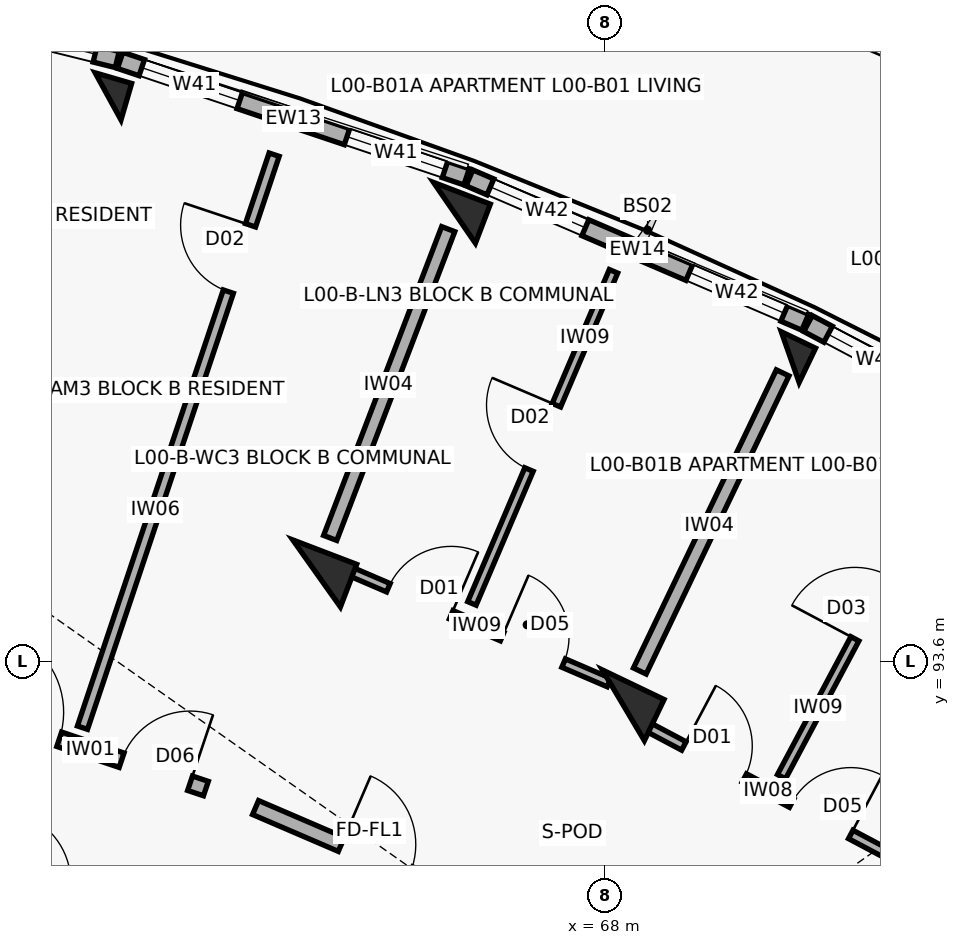
"""IFC4 building model, lengths in metres.
Left out: names, types, materials, properties, quantities, classifications, styles, units other than length and angle.
Written with IfcOpenShell. Run it as: python <this file> out.ifc"""

import sys

from ifc_helpers import new_model, si_unit, direction, frame, frame_2d, origin, origin_2d, place, context, subcontext, project, spatial, rectangle, extrude, element, fill, save


model = new_model("IFC4")
c1 = context("Model", 3, precision=1e-05, world=origin(), true_north=direction((0.0, 1.0)))
c2 = subcontext(c1, "Body", "Model", "MODEL_VIEW")
j1 = project(units=[si_unit("LENGTHUNIT", "METRE"), si_unit("PLANEANGLEUNIT", "RADIAN")], contexts=[c1])
p1 = place(None, origin())
s1 = spatial("IfcSite", under=j1, at=p1, CompositionType="ELEMENT")
p2 = place(p1, origin())
s2 = spatial("IfcBuilding", under=s1, at=p2, CompositionType="ELEMENT")
p3 = place(p2, origin())
s3 = spatial("IfcBuildingStorey", under=s2, at=p3, CompositionType="ELEMENT", Elevation=0.0)
p4 = place(p3, frame((61.467, 101.031, 0.0), z_axis=(0.0, 0.0, 1.0), x_axis=(0.27966144946, 0.96009867914, 0.0)))
e1 = element("IfcColumn", 1, at=p4, inside=s3, PredefinedType="COLUMN", context=c2, shape_type="SweptSolid", body=[
    extrude(rectangle(XDim=0.5, YDim=0.5, at=origin_2d()), origin(), (0.0, 0.0, 1.0), 4.5),
])
p5 = place(p3, frame((64.21, 94.753, 0.0), z_axis=(0.0, 0.0, 1.0), x_axis=(0.357064076459, 0.934079892355, 0.0)))
e2 = element("IfcColumn", 2, at=p5, inside=s3, PredefinedType="COLUMN", context=c2, shape_type="SweptSolid", body=[
    extrude(rectangle(XDim=0.6, YDim=0.9, at=origin_2d()), origin(), (0.0, 0.0, 1.0), 4.5),
])
p6 = place(p3, frame((66.024, 99.499, 0.0), z_axis=(0.0, 0.0, 1.0), x_axis=(0.357064076459, 0.934079892355, 0.0)))
e3 = element("IfcColumn", 3, at=p6, inside=s3, PredefinedType="COLUMN", context=c2, shape_type="SweptSolid", body=[
    extrude(rectangle(XDim=0.55, YDim=0.8, at=origin_2d()), origin(), (0.0, 0.0, 1.0), 4.5),
])
p7 = place(p3, frame((68.246, 93.019, 0.0), z_axis=(0.0, 0.0, 1.0), x_axis=(0.432085748802, 0.901832526405, 0.0)))
e4 = element("IfcColumn", 4, at=p7, inside=s3, PredefinedType="COLUMN", context=c2, shape_type="SweptSolid", body=[
    extrude(rectangle(XDim=0.6, YDim=0.9, at=origin_2d()), origin(), (0.0, 0.0, 1.0), 4.5),
])
p8 = place(p3, frame((70.441, 97.6, 0.0), z_axis=(0.0, 0.0, 1.0), x_axis=(0.432085748802, 0.901832526405, 0.0)))
e5 = element("IfcColumn", 5, at=p8, inside=s3, PredefinedType="COLUMN", context=c2, shape_type="SweptSolid", body=[
    extrude(rectangle(XDim=0.5, YDim=0.5, at=origin_2d()), origin(), (0.0, 0.0, 1.0), 4.5),
])
p9 = place(p3, frame((72.127, 90.96, 0.0), z_axis=(0.0, 0.0, 1.0), x_axis=(0.504226211181, 0.863571611366, 0.0)))
e6 = element("IfcColumn", 6, at=p9, inside=s3, PredefinedType="COLUMN", context=c2, shape_type="SweptSolid", body=[
    extrude(rectangle(XDim=0.6, YDim=0.9, at=origin_2d()), origin(), (0.0, 0.0, 1.0), 4.5),
])
p10 = place(p3, frame((56.919, 102.671, 0.0), z_axis=(0.0, 0.0, 1.0), x_axis=(0.970716115822, -0.240229520426, 0.0)))
e7 = element("IfcWall", 7, at=p10, inside=s3, PredefinedType="SOLIDWALL", context=c2, shape_type="SweptSolid", body=[
    extrude(rectangle(XDim=4.809, YDim=0.218, at=frame_2d((2.405, 0.0))), origin(), (0.0, 0.0, 1.0), 3.45),
])
p11 = place(p10, frame((0.3, 0.0, 0.3)))
e8 = element("IfcOpeningElement", 8, at=p11, cuts=e7, PredefinedType="OPENING", context=c2, shape_type="SweptSolid", body=[
    extrude(rectangle(XDim=1.26, YDim=1.56, at=frame_2d((0.63, 0.78))), frame((0.0, 0.119, 0.0), z_axis=(0.0, -1.0, 0.0), x_axis=(1.0, 0.0, 0.0)), (0.0, 0.0, 1.0), 0.238),
])
p12 = place(p10, frame((3.249, 0.0, 0.3)))
e9 = element("IfcOpeningElement", 9, at=p12, cuts=e7, PredefinedType="OPENING", context=c2, shape_type="SweptSolid", body=[
    extrude(rectangle(XDim=1.26, YDim=1.56, at=frame_2d((0.63, 0.78))), frame((0.0, 0.119, 0.0), z_axis=(0.0, -1.0, 0.0), x_axis=(1.0, 0.0, 0.0)), (0.0, 0.0, 1.0), 0.238),
])
p13 = place(p3, frame((61.625, 101.504, 0.0), z_axis=(0.0, 0.0, 1.0), x_axis=(0.947867898788, -0.318663531717, 0.0)))
e10 = element("IfcWall", 10, at=p13, inside=s3, PredefinedType="SOLIDWALL", context=c2, shape_type="SweptSolid", body=[
    extrude(rectangle(XDim=4.809, YDim=0.224, at=frame_2d((2.405, 0.0))), origin(), (0.0, 0.0, 1.0), 3.45),
])
p14 = place(p13, frame((0.3, 0.0, 0.3)))
e11 = element("IfcOpeningElement", 11, at=p14, cuts=e10, PredefinedType="OPENING", context=c2, shape_type="SweptSolid", body=[
    extrude(rectangle(XDim=1.36, YDim=1.16, at=frame_2d((0.68, 0.58))), frame((0.0, 0.122, 0.0), z_axis=(0.0, -1.0, 0.0), x_axis=(1.0, 0.0, 0.0)), (0.0, 0.0, 1.0), 0.244),
])
p15 = place(p13, frame((3.149, 0.0, 0.3)))
e12 = element("IfcOpeningElement", 12, at=p15, cuts=e10, PredefinedType="OPENING", context=c2, shape_type="SweptSolid", body=[
    extrude(rectangle(XDim=1.36, YDim=1.16, at=frame_2d((0.68, 0.58))), frame((0.0, 0.122, 0.0), z_axis=(0.0, -1.0, 0.0), x_axis=(1.0, 0.0, 0.0)), (0.0, 0.0, 1.0), 0.244),
])
p16 = place(p3, frame((66.221, 99.958, 0.0), z_axis=(0.0, 0.0, 1.0), x_axis=(0.918711189033, -0.394930058548, 0.0)))
e13 = element("IfcWall", 13, at=p16, inside=s3, PredefinedType="SOLIDWALL", context=c2, shape_type="SweptSolid", body=[
    extrude(rectangle(XDim=4.809, YDim=0.228, at=frame_2d((2.404, 0.0))), origin(), (0.0, 0.0, 1.0), 3.45),
])
p17 = place(p16, frame((0.3, 0.0, 0.3)))
e14 = element("IfcOpeningElement", 14, at=p17, cuts=e13, PredefinedType="OPENING", context=c2, shape_type="SweptSolid", body=[
    extrude(rectangle(XDim=1.36, YDim=1.28, at=frame_2d((0.68, 0.64))), frame((0.0, 0.124, 0.0), z_axis=(0.0, -1.0, 0.0), x_axis=(1.0, 0.0, 0.0)), (0.0, 0.0, 1.0), 0.248),
])
p18 = place(p16, frame((3.149, 0.0, 0.3)))
e15 = element("IfcOpeningElement", 15, at=p18, cuts=e13, PredefinedType="OPENING", context=c2, shape_type="SweptSolid", body=[
    extrude(rectangle(XDim=1.36, YDim=1.28, at=frame_2d((0.68, 0.64))), frame((0.0, 0.124, 0.0), z_axis=(0.0, -1.0, 0.0), x_axis=(1.0, 0.0, 0.0)), (0.0, 0.0, 1.0), 0.248),
])
p19 = place(p3, frame((70.675, 98.042, 0.0), z_axis=(0.0, 0.0, 1.0), x_axis=(0.883448093208, -0.468529045639, 0.0)))
e16 = element("IfcWall", 16, at=p19, inside=s3, PredefinedType="SOLIDWALL", context=c2, shape_type="SweptSolid", body=[
    extrude(rectangle(XDim=4.809, YDim=0.238, at=frame_2d((2.405, 0.0))), origin(), (0.0, 0.0, 1.0), 3.45),
])
p20 = place(p19, frame((0.3, 0.0, 0.3)))
e17 = element("IfcOpeningElement", 17, at=p20, cuts=e16, PredefinedType="OPENING", context=c2, shape_type="SweptSolid", body=[
    extrude(rectangle(XDim=1.36, YDim=1.42, at=frame_2d((0.68, 0.71))), frame((0.0, 0.129, 0.0), z_axis=(0.0, -1.0, 0.0), x_axis=(1.0, 0.0, 0.0)), (0.0, 0.0, 1.0), 0.258),
])
p21 = place(p19, frame((3.149, 0.0, 0.3)))
e18 = element("IfcOpeningElement", 18, at=p21, cuts=e16, PredefinedType="OPENING", context=c2, shape_type="SweptSolid", body=[
    extrude(rectangle(XDim=1.36, YDim=1.42, at=frame_2d((0.68, 0.71))), frame((0.0, 0.129, 0.0), z_axis=(0.0, -1.0, 0.0), x_axis=(1.0, 0.0, 0.0)), (0.0, 0.0, 1.0), 0.258),
])
p22 = place(p3, frame((59.497, 93.018, 0.0), z_axis=(0.0, 0.0, 1.0), x_axis=(0.947863007629, -0.318678080151, 0.0)))
e19 = element("IfcWall", 19, at=p22, inside=s3, PredefinedType="SOLIDWALL", context=c2, shape_type="SweptSolid", body=[
    extrude(rectangle(XDim=3.436, YDim=0.2, at=frame_2d((1.718, 0.0))), origin(), (0.0, 0.0, 1.0), 3.34),
])
p23 = place(p22, frame((0.28, 0.0, 0.0)))
e20 = element("IfcOpeningElement", 20, at=p23, cuts=e19, PredefinedType="OPENING", context=c2, shape_type="SweptSolid", body=[
    extrude(rectangle(XDim=1.12, YDim=2.15, at=frame_2d((0.56, 1.075))), frame((0.0, 0.11, 0.0), z_axis=(0.0, -1.0, 0.0), x_axis=(1.0, 0.0, 0.0)), (0.0, 0.0, 1.0), 0.22),
])
p24 = place(p22, frame((2.266, 0.0, 0.0)))
e21 = element("IfcOpeningElement", 21, at=p24, cuts=e19, PredefinedType="OPENING", context=c2, shape_type="SweptSolid", body=[
    extrude(rectangle(XDim=0.95, YDim=2.1, at=frame_2d((0.475, 1.05))), frame((0.0, 0.11, 0.0), z_axis=(0.0, -1.0, 0.0), x_axis=(1.0, 0.0, 0.0)), (0.0, 0.0, 1.0), 0.22),
])
p25 = place(p3, frame((58.923, 91.049, 0.0), z_axis=(0.0, 0.0, 1.0), x_axis=(0.94787351033, -0.318646839643, 0.0)))
e22 = element("IfcWall", 22, at=p25, inside=s3, PredefinedType="SOLIDWALL", context=c2, shape_type="SweptSolid", body=[
    extrude(rectangle(XDim=3.269, YDim=0.19, at=frame_2d((1.634, 0.0))), origin(), (0.0, 0.0, 1.0), 3.34),
])
p26 = place(p25, frame((1.154, 0.0, 0.0)))
e23 = element("IfcOpeningElement", 23, at=p26, cuts=e22, PredefinedType="OPENING", context=c2, shape_type="SweptSolid", body=[
    extrude(rectangle(XDim=0.96, YDim=2.1, at=frame_2d((0.48, 1.05))), frame((0.0, 0.105, 0.0), z_axis=(0.0, -1.0, 0.0), x_axis=(1.0, 0.0, 0.0)), (0.0, 0.0, 1.0), 0.21),
])
p27 = place(p3, frame((61.13, 92.724, 0.0), z_axis=(0.0, 0.0, 1.0), x_axis=(0.317204178278, 0.948357268798, 0.0)))
e24 = element("IfcWall", 24, at=p27, inside=s3, PredefinedType="PARTITIONING", context=c2, shape_type="SweptSolid", body=[
    extrude(rectangle(XDim=7.95, YDim=0.14, at=frame_2d((3.975, 0.0))), origin(), (0.0, 0.0, 1.0), 3.34),
])
p28 = place(p27, frame((6.05, 0.0, 0.0)))
e25 = element("IfcOpeningElement", 25, at=p28, cuts=e24, PredefinedType="OPENING", context=c2, shape_type="SweptSolid", body=[
    extrude(rectangle(XDim=0.92, YDim=2.1, at=frame_2d((0.46, 1.05))), frame((0.0, 0.08, 0.0), z_axis=(0.0, -1.0, 0.0), x_axis=(1.0, 0.0, 0.0)), (0.0, 0.0, 1.0), 0.16),
])
p29 = place(p3, frame((63.407, 91.673, 0.0), z_axis=(0.0, 0.0, 1.0), x_axis=(0.918718172399, -0.394913813008, 0.0)))
e26 = element("IfcWall", 26, at=p29, inside=s3, PredefinedType="SOLIDWALL", context=c2, shape_type="SweptSolid", body=[
    extrude(rectangle(XDim=3.436, YDim=0.2, at=frame_2d((1.718, 0.0))), origin(), (0.0, 0.0, 1.0), 3.34),
])
p30 = place(p29, frame((1.228, 0.0, 0.0)))
e27 = element("IfcOpeningElement", 27, at=p30, cuts=e26, PredefinedType="OPENING", context=c2, shape_type="SweptSolid", body=[
    extrude(rectangle(XDim=0.98, YDim=2.15, at=frame_2d((0.49, 1.075))), frame((0.0, 0.11, 0.0), z_axis=(0.0, -1.0, 0.0), x_axis=(1.0, 0.0, 0.0)), (0.0, 0.0, 1.0), 0.22),
])
p31 = place(p3, frame((64.557, 94.822, 0.0), z_axis=(0.0, 0.0, 1.0), x_axis=(0.918726854017, -0.394893615684, 0.0)))
e28 = element("IfcWall", 28, at=p31, inside=s3, PredefinedType="PARTITIONING", context=c2, shape_type="SweptSolid", body=[
    extrude(rectangle(XDim=3.81, YDim=0.12, at=frame_2d((1.905, 0.0))), origin(), (0.0, 0.0, 1.0), 3.34),
])
p32 = place(p31, frame((0.65, 0.0, 0.0)))
e29 = element("IfcOpeningElement", 29, at=p32, cuts=e28, PredefinedType="OPENING", context=c2, shape_type="SweptSolid", body=[
    extrude(rectangle(XDim=0.9, YDim=2.1, at=frame_2d((0.45, 1.05))), frame((0.0, 0.07, 0.0), z_axis=(0.0, -1.0, 0.0), x_axis=(1.0, 0.0, 0.0)), (0.0, 0.0, 1.0), 0.14),
])
p33 = place(p31, frame((2.28, 0.0, 0.0)))
e30 = element("IfcOpeningElement", 30, at=p33, cuts=e28, PredefinedType="OPENING", context=c2, shape_type="SweptSolid", body=[
    extrude(rectangle(XDim=0.88, YDim=2.1, at=frame_2d((0.44, 1.05))), frame((0.0, 0.07, 0.0), z_axis=(0.0, -1.0, 0.0), x_axis=(1.0, 0.0, 0.0)), (0.0, 0.0, 1.0), 0.14),
])
p34 = place(p3, frame((66.253, 94.359, 0.0), z_axis=(0.0, 0.0, 1.0), x_axis=(0.392156908456, 0.919898341748, 0.0)))
e31 = element("IfcWall", 31, at=p34, inside=s3, PredefinedType="PARTITIONING", context=c2, shape_type="SweptSolid", body=[
    extrude(rectangle(XDim=4.75, YDim=0.12, at=frame_2d((2.375, 0.0))), origin(), (0.0, 0.0, 1.0), 3.34),
])
p35 = place(p34, frame((1.915, 0.0, 0.0)))
e32 = element("IfcOpeningElement", 32, at=p35, cuts=e31, PredefinedType="OPENING", context=c2, shape_type="SweptSolid", body=[
    extrude(rectangle(XDim=0.92, YDim=2.1, at=frame_2d((0.46, 1.05))), frame((0.0, 0.07, 0.0), z_axis=(0.0, -1.0, 0.0), x_axis=(1.0, 0.0, 0.0)), (0.0, 0.0, 1.0), 0.14),
])
p36 = place(p3, frame((64.389, 95.22, 0.0), z_axis=(0.0, 0.0, 1.0), x_axis=(0.357064016205, 0.934079915388, 0.0)))
e33 = element("IfcWall", 33, at=p36, inside=s3, PredefinedType="SOLIDWALL", context=c2, shape_type="SweptSolid", body=[
    extrude(rectangle(XDim=4.35, YDim=0.185, at=frame_2d((2.175, 0.0))), origin(), (0.0, 0.0, 1.0), 3.34),
])
p37 = place(p3, frame((68.468, 92.788, 0.0), z_axis=(0.0, 0.0, 1.0), x_axis=(0.883450371448, -0.468524749814, 0.0)))
e34 = element("IfcWall", 34, at=p37, inside=s3, PredefinedType="PARTITIONING", context=c2, shape_type="SweptSolid", body=[
    extrude(rectangle(XDim=3.785, YDim=0.125, at=frame_2d((1.893, 0.0))), origin(), (0.0, 0.0, 1.0), 3.34),
])
p38 = place(p37, frame((0.65, 0.0, 0.0)))
e35 = element("IfcOpeningElement", 35, at=p38, cuts=e34, PredefinedType="OPENING", context=c2, shape_type="SweptSolid", body=[
    extrude(rectangle(XDim=0.9, YDim=2.1, at=frame_2d((0.45, 1.05))), frame((0.0, 0.073, 0.0), z_axis=(0.0, -1.0, 0.0), x_axis=(1.0, 0.0, 0.0)), (0.0, 0.0, 1.0), 0.145),
])
p39 = place(p37, frame((2.255, 0.0, 0.0)))
e36 = element("IfcOpeningElement", 36, at=p39, cuts=e34, PredefinedType="OPENING", context=c2, shape_type="SweptSolid", body=[
    extrude(rectangle(XDim=0.88, YDim=2.1, at=frame_2d((0.44, 1.05))), frame((0.0, 0.073, 0.0), z_axis=(0.0, -1.0, 0.0), x_axis=(1.0, 0.0, 0.0)), (0.0, 0.0, 1.0), 0.145),
])
p40 = place(p3, frame((70.326, 92.079, 0.0), z_axis=(0.0, 0.0, 1.0), x_axis=(0.469847866249, 0.882747405876, 0.0)))
e37 = element("IfcWall", 37, at=p40, inside=s3, PredefinedType="PARTITIONING", context=c2, shape_type="SweptSolid", body=[
    extrude(rectangle(XDim=5.05, YDim=0.12, at=frame_2d((2.525, 0.0))), origin(), (0.0, 0.0, 1.0), 3.34),
])
p41 = place(p40, frame((2.055, 0.0, 0.0)))
e38 = element("IfcOpeningElement", 38, at=p41, cuts=e37, PredefinedType="OPENING", context=c2, shape_type="SweptSolid", body=[
    extrude(rectangle(XDim=0.94, YDim=2.1, at=frame_2d((0.47, 1.05))), frame((0.0, 0.07, 0.0), z_axis=(0.0, -1.0, 0.0), x_axis=(1.0, 0.0, 0.0)), (0.0, 0.0, 1.0), 0.14),
])
p42 = place(p3, frame((68.462, 93.469, 0.0), z_axis=(0.0, 0.0, 1.0), x_axis=(0.432086898897, 0.901831975371, 0.0)))
e39 = element("IfcWall", 39, at=p42, inside=s3, PredefinedType="SOLIDWALL", context=c2, shape_type="SweptSolid", body=[
    extrude(rectangle(XDim=4.35, YDim=0.185, at=frame_2d((2.175, 0.0))), origin(), (0.0, 0.0, 1.0), 3.34),
])
p43 = place(p12, origin())
e40 = element("IfcWindow", 40, at=p43, inside=s3, PartitioningType="DOUBLE_PANEL_VERTICAL", PredefinedType="WINDOW", context=c2, shape_type="SweptSolid", body=[
    extrude(rectangle(XDim=1.26, YDim=1.56, at=frame_2d((0.63, 0.78))), frame((0.0, 0.03, 0.0), z_axis=(0.0, -1.0, 0.0), x_axis=(1.0, 0.0, 0.0)), (0.0, 0.0, 1.0), 0.06),
])
fill(e9, e40)
p44 = place(p14, origin())
e41 = element("IfcWindow", 41, at=p44, inside=s3, PartitioningType="DOUBLE_PANEL_VERTICAL", PredefinedType="WINDOW", context=c2, shape_type="SweptSolid", body=[
    extrude(rectangle(XDim=1.36, YDim=1.16, at=frame_2d((0.68, 0.58))), frame((0.0, 0.03, 0.0), z_axis=(0.0, -1.0, 0.0), x_axis=(1.0, 0.0, 0.0)), (0.0, 0.0, 1.0), 0.06),
])
fill(e11, e41)
p45 = place(p15, origin())
e42 = element("IfcWindow", 42, at=p45, inside=s3, PartitioningType="DOUBLE_PANEL_VERTICAL", PredefinedType="WINDOW", context=c2, shape_type="SweptSolid", body=[
    extrude(rectangle(XDim=1.36, YDim=1.16, at=frame_2d((0.68, 0.58))), frame((0.0, 0.03, 0.0), z_axis=(0.0, -1.0, 0.0), x_axis=(1.0, 0.0, 0.0)), (0.0, 0.0, 1.0), 0.06),
])
fill(e12, e42)
p46 = place(p17, origin())
e43 = element("IfcWindow", 43, at=p46, inside=s3, PartitioningType="DOUBLE_PANEL_VERTICAL", PredefinedType="WINDOW", context=c2, shape_type="SweptSolid", body=[
    extrude(rectangle(XDim=1.36, YDim=1.28, at=frame_2d((0.68, 0.64))), frame((0.0, 0.03, 0.0), z_axis=(0.0, -1.0, 0.0), x_axis=(1.0, 0.0, 0.0)), (0.0, 0.0, 1.0), 0.06),
])
fill(e14, e43)
p47 = place(p18, origin())
e44 = element("IfcWindow", 44, at=p47, inside=s3, PartitioningType="DOUBLE_PANEL_VERTICAL", PredefinedType="WINDOW", context=c2, shape_type="SweptSolid", body=[
    extrude(rectangle(XDim=1.36, YDim=1.28, at=frame_2d((0.68, 0.64))), frame((0.0, 0.03, 0.0), z_axis=(0.0, -1.0, 0.0), x_axis=(1.0, 0.0, 0.0)), (0.0, 0.0, 1.0), 0.06),
])
fill(e15, e44)
p48 = place(p20, origin())
e45 = element("IfcWindow", 45, at=p48, inside=s3, PartitioningType="DOUBLE_PANEL_VERTICAL", PredefinedType="WINDOW", context=c2, shape_type="SweptSolid", body=[
    extrude(rectangle(XDim=1.36, YDim=1.42, at=frame_2d((0.68, 0.71))), frame((0.0, 0.03, 0.0), z_axis=(0.0, -1.0, 0.0), x_axis=(1.0, 0.0, 0.0)), (0.0, 0.0, 1.0), 0.06),
])
fill(e17, e45)
p49 = place(p23, origin())
e46 = element("IfcDoor", 46, at=p49, inside=s3, OperationType="SINGLE_SWING_LEFT", PredefinedType="DOOR", context=c2, shape_type="SweptSolid", body=[
    extrude(rectangle(XDim=1.12, YDim=2.15, at=frame_2d((0.56, 1.075))), frame((0.0, 0.025, 0.0), z_axis=(0.0, -1.0, 0.0), x_axis=(1.0, 0.0, 0.0)), (0.0, 0.0, 1.0), 0.05),
])
fill(e20, e46)
p50 = place(p24, origin())
e47 = element("IfcDoor", 47, at=p50, inside=s3, OperationType="SINGLE_SWING_RIGHT", PredefinedType="DOOR", context=c2, shape_type="SweptSolid", body=[
    extrude(rectangle(XDim=0.95, YDim=2.1, at=frame_2d((0.475, 1.05))), frame((0.0, 0.025, 0.0), z_axis=(0.0, -1.0, 0.0), x_axis=(1.0, 0.0, 0.0)), (0.0, 0.0, 1.0), 0.05),
])
fill(e21, e47)
p51 = place(p28, origin())
e48 = element("IfcDoor", 48, at=p51, inside=s3, OperationType="SINGLE_SWING_RIGHT", PredefinedType="DOOR", context=c2, shape_type="SweptSolid", body=[
    extrude(rectangle(XDim=0.92, YDim=2.1, at=frame_2d((0.46, 1.05))), frame((0.0, 0.025, 0.0), z_axis=(0.0, -1.0, 0.0), x_axis=(1.0, 0.0, 0.0)), (0.0, 0.0, 1.0), 0.05),
])
fill(e25, e48)
p52 = place(p30, origin())
e49 = element("IfcDoor", 49, at=p52, inside=s3, OperationType="SINGLE_SWING_LEFT", PredefinedType="DOOR", context=c2, shape_type="SweptSolid", body=[
    extrude(rectangle(XDim=0.98, YDim=2.15, at=frame_2d((0.49, 1.075))), frame((0.0, 0.025, 0.0), z_axis=(0.0, -1.0, 0.0), x_axis=(1.0, 0.0, 0.0)), (0.0, 0.0, 1.0), 0.05),
])
fill(e27, e49)
p53 = place(p32, origin())
e50 = element("IfcDoor", 50, at=p53, inside=s3, OperationType="SINGLE_SWING_RIGHT", PredefinedType="DOOR", context=c2, shape_type="SweptSolid", body=[
    extrude(rectangle(XDim=0.9, YDim=2.1, at=frame_2d((0.45, 1.05))), frame((0.0, 0.025, 0.0), z_axis=(0.0, -1.0, 0.0), x_axis=(1.0, 0.0, 0.0)), (0.0, 0.0, 1.0), 0.05),
])
fill(e29, e50)
p54 = place(p33, origin())
e51 = element("IfcDoor", 51, at=p54, inside=s3, OperationType="SINGLE_SWING_LEFT", PredefinedType="DOOR", context=c2, shape_type="SweptSolid", body=[
    extrude(rectangle(XDim=0.88, YDim=2.1, at=frame_2d((0.44, 1.05))), frame((0.0, 0.025, 0.0), z_axis=(0.0, -1.0, 0.0), x_axis=(1.0, 0.0, 0.0)), (0.0, 0.0, 1.0), 0.05),
])
fill(e30, e51)
p55 = place(p35, origin())
e52 = element("IfcDoor", 52, at=p55, inside=s3, OperationType="SINGLE_SWING_RIGHT", PredefinedType="DOOR", context=c2, shape_type="SweptSolid", body=[
    extrude(rectangle(XDim=0.92, YDim=2.1, at=frame_2d((0.46, 1.05))), frame((0.0, 0.025, 0.0), z_axis=(0.0, -1.0, 0.0), x_axis=(1.0, 0.0, 0.0)), (0.0, 0.0, 1.0), 0.05),
])
fill(e32, e52)
p56 = place(p38, origin())
e53 = element("IfcDoor", 53, at=p56, inside=s3, OperationType="SINGLE_SWING_LEFT", PredefinedType="DOOR", context=c2, shape_type="SweptSolid", body=[
    extrude(rectangle(XDim=0.9, YDim=2.1, at=frame_2d((0.45, 1.05))), frame((0.0, 0.025, 0.0), z_axis=(0.0, -1.0, 0.0), x_axis=(1.0, 0.0, 0.0)), (0.0, 0.0, 1.0), 0.05),
])
fill(e35, e53)
p57 = place(p39, origin())
e54 = element("IfcDoor", 54, at=p57, inside=s3, OperationType="SINGLE_SWING_RIGHT", PredefinedType="DOOR", context=c2, shape_type="SweptSolid", body=[
    extrude(rectangle(XDim=0.88, YDim=2.1, at=frame_2d((0.44, 1.05))), frame((0.0, 0.025, 0.0), z_axis=(0.0, -1.0, 0.0), x_axis=(1.0, 0.0, 0.0)), (0.0, 0.0, 1.0), 0.05),
])
fill(e36, e54)
p58 = place(p41, origin())
e55 = element("IfcDoor", 55, at=p58, inside=s3, OperationType="SINGLE_SWING_LEFT", PredefinedType="DOOR", context=c2, shape_type="SweptSolid", body=[
    extrude(rectangle(XDim=0.94, YDim=2.1, at=frame_2d((0.47, 1.05))), frame((0.0, 0.025, 0.0), z_axis=(0.0, -1.0, 0.0), x_axis=(1.0, 0.0, 0.0)), (0.0, 0.0, 1.0), 0.05),
])
fill(e38, e55)
save(model, sys.argv[1])
